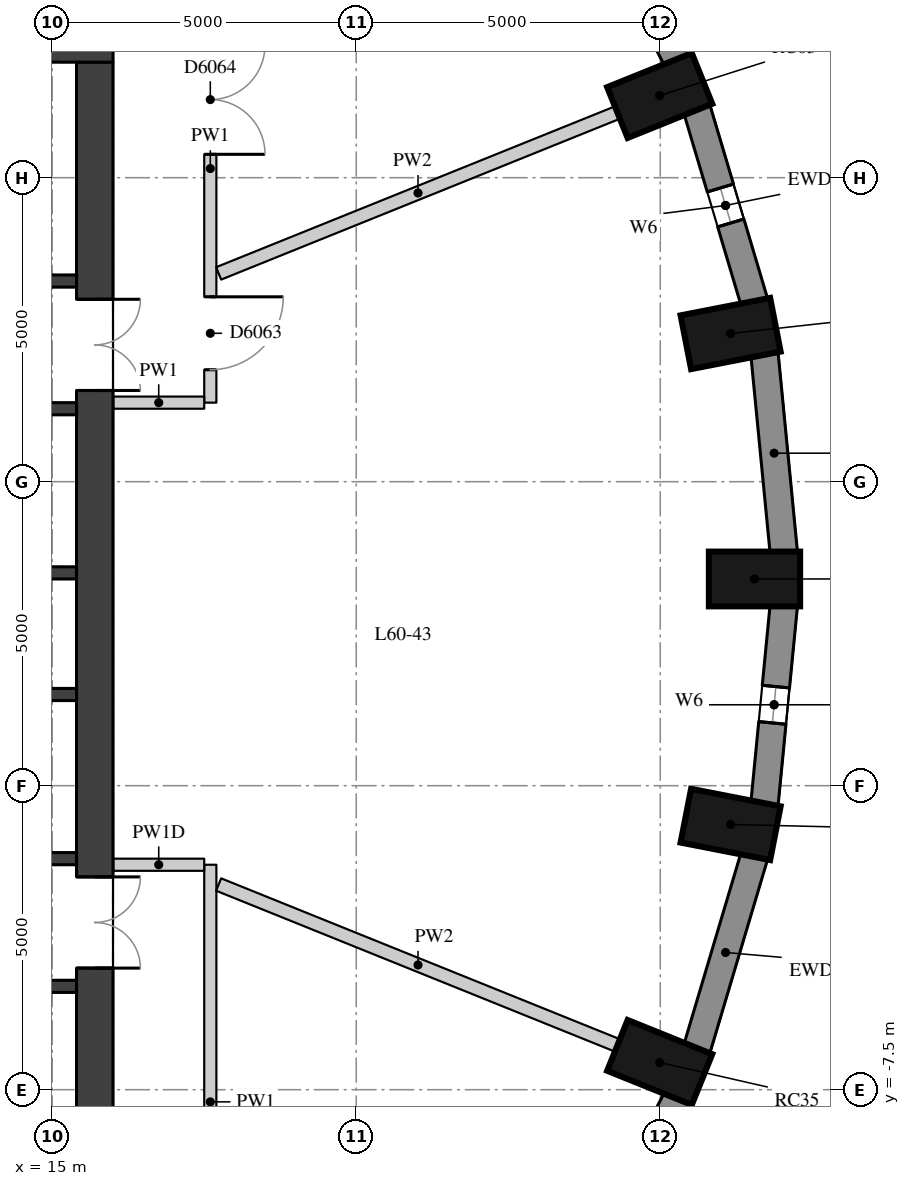
"""IFC4 building model, lengths in metres.
Left out: names, types, materials, properties, quantities, classifications, styles, units other than length and angle.
Written with IfcOpenShell. Run it as: python <this file> out.ifc"""

import sys

from ifc_helpers import new_model, si_unit, direction, frame, frame_2d, origin, origin_2d, place, context, subcontext, project, spatial, rectangle, extrude, element, fill, save


model = new_model("IFC4")
c1 = context("Model", 3, precision=1e-05, world=origin(), true_north=direction((0.0, 1.0)))
c2 = subcontext(c1, "Body", "Model", "MODEL_VIEW")
j1 = project(units=[si_unit("LENGTHUNIT", "METRE"), si_unit("PLANEANGLEUNIT", "RADIAN")], contexts=[c1])
p1 = place(None, origin())
s1 = spatial("IfcSite", under=j1, at=p1, CompositionType="ELEMENT")
p2 = place(p1, origin())
s2 = spatial("IfcBuilding", under=s1, at=p2, CompositionType="ELEMENT")
p3 = place(p2, frame((0.0, 0.0, 212.3)))
s3 = spatial("IfcBuildingStorey", under=s2, at=p3, CompositionType="ELEMENT", Elevation=212.3)
for number, where, z_axis, x_axis in (
    (1, (26.55, 0.9, 0.0), (0.0, 0.0, 1.0), (1.0, 0.0, 0.0)),
    (2, (26.157, 4.937, 0.0), (0.0, 0.0, 1.0), (0.981, 0.192, 0.0)),
    (3, (24.991, 8.852, 0.0), (0.0, 0.0, 1.0), (0.927, 0.374, 0.0)),
    (4, (24.991, -7.052, 0.0), (0.0, 0.0, 1.0), (0.927, -0.374, 0.0)),
    (5, (26.157, -3.137, 0.0), (0.0, 0.0, 1.0), (0.981, -0.192, 0.0)),
):
    element("IfcColumn", number, at=place(p3, frame(where, z_axis=z_axis, x_axis=x_axis)), inside=s3, PredefinedType="COLUMN", context=c2, shape_type="SweptSolid", body=[
        extrude(rectangle(XDim=1.5, YDim=0.9, at=origin_2d()), origin(), (0.0, 0.0, 1.0), 3.3),
    ])
p4 = place(p3, frame((27.032, 1.33, 0.0), z_axis=(0.0, 0.0, 1.0), x_axis=(-0.096824116835, 0.995301507283, 0.0)))
e6 = element("IfcWall", 6, at=p4, inside=s3, PredefinedType="SOLIDWALL", context=c2, shape_type="SweptSolid", body=[
    extrude(rectangle(XDim=3.293, YDim=0.45, at=frame_2d((1.646, 0.0))), origin(), (0.0, 0.0, 1.0), 3.02),
])
p5 = place(p3, frame((26.548, 5.452, 0.0), z_axis=(0.0, 0.0, 1.0), x_axis=(-0.285444972963, 0.958395099847, 0.0)))
e7 = element("IfcWall", 7, at=p5, inside=s3, PredefinedType="SOLIDWALL", context=c2, shape_type="SweptSolid", body=[
    extrude(rectangle(XDim=3.32, YDim=0.45, at=frame_2d((1.66, 0.0))), origin(), (0.0, 0.0, 1.0), 3.02),
])
p6 = place(p5, frame((1.36, 0.0, 0.4)))
e8 = element("IfcOpeningElement", 8, at=p6, cuts=e7, PredefinedType="OPENING", context=c2, shape_type="SweptSolid", body=[
    extrude(rectangle(XDim=0.6, YDim=1.75, at=frame_2d((0.3, 0.875))), frame((0.0, 0.235, 0.0), z_axis=(0.0, -1.0, 0.0), x_axis=(1.0, 0.0, 0.0)), (0.0, 0.0, 1.0), 0.47),
])
p7 = place(p3, frame((25.278, 9.432, 0.0), z_axis=(0.0, 0.0, 1.0), x_axis=(-0.460175500475, 0.887827972505, 0.0)))
e9 = element("IfcWall", 9, at=p7, inside=s3, PredefinedType="SOLIDWALL", context=c2, shape_type="SweptSolid", body=[
    extrude(rectangle(XDim=3.371, YDim=0.45, at=frame_2d((1.685, 0.0))), origin(), (0.0, 0.0, 1.0), 3.02),
])
p8 = place(p3, frame((23.727, -10.624, 0.0), z_axis=(0.0, 0.0, 1.0), x_axis=(0.460175500475, 0.887827972505, 0.0)))
e10 = element("IfcWall", 10, at=p8, inside=s3, PredefinedType="SOLIDWALL", context=c2, shape_type="SweptSolid", body=[
    extrude(rectangle(XDim=3.371, YDim=0.45, at=frame_2d((1.685, 0.0))), origin(), (0.0, 0.0, 1.0), 3.02),
])
p9 = place(p8, frame((1.385, 0.0, 0.4)))
e11 = element("IfcOpeningElement", 11, at=p9, cuts=e10, PredefinedType="OPENING", context=c2, shape_type="SweptSolid", body=[
    extrude(rectangle(XDim=0.6, YDim=1.75, at=frame_2d((0.3, 0.875))), frame((0.0, 0.235, 0.0), z_axis=(0.0, -1.0, 0.0), x_axis=(1.0, 0.0, 0.0)), (0.0, 0.0, 1.0), 0.47),
])
p10 = place(p3, frame((25.6, -6.834, 0.0), z_axis=(0.0, 0.0, 1.0), x_axis=(0.285444972963, 0.958395099847, 0.0)))
e12 = element("IfcWall", 12, at=p10, inside=s3, PredefinedType="SOLIDWALL", context=c2, shape_type="SweptSolid", body=[
    extrude(rectangle(XDim=3.32, YDim=0.45, at=frame_2d((1.66, 0.0))), origin(), (0.0, 0.0, 1.0), 3.02),
])
p11 = place(p3, frame((26.713, -2.808, 0.0), z_axis=(0.0, 0.0, 1.0), x_axis=(0.096816972749, 0.995302202242, 0.0)))
e13 = element("IfcWall", 13, at=p11, inside=s3, PredefinedType="SOLIDWALL", context=c2, shape_type="SweptSolid", body=[
    extrude(rectangle(XDim=3.293, YDim=0.45, at=frame_2d((1.646, 0.0))), origin(), (0.0, 0.0, 1.0), 3.02),
])
p12 = place(p11, frame((1.347, 0.0, 0.4)))
e14 = element("IfcOpeningElement", 14, at=p12, cuts=e13, PredefinedType="OPENING", context=c2, shape_type="SweptSolid", body=[
    extrude(rectangle(XDim=0.6, YDim=1.75, at=frame_2d((0.3, 0.875))), frame((0.0, 0.235, 0.0), z_axis=(0.0, -1.0, 0.0), x_axis=(1.0, 0.0, 0.0)), (0.0, 0.0, 1.0), 0.47),
])
p13 = place(p3, frame((15.7, -9.4, 0.0), z_axis=(0.0, 0.0, 1.0), x_axis=(0.0, 1.0, 0.0)))
e15 = element("IfcWall", 15, at=p13, inside=s3, PredefinedType="SHEAR", context=c2, shape_type="SweptSolid", body=[
    extrude(rectangle(XDim=18.8, YDim=0.6, at=frame_2d((9.4, 0.0))), origin(), (0.0, 0.0, 1.0), 3.02),
])
p14 = place(p13, frame((13.4, 0.0, 0.0)))
e16 = element("IfcOpeningElement", 16, at=p14, cuts=e15, PredefinedType="OPENING", context=c2, shape_type="SweptSolid", body=[
    extrude(rectangle(XDim=1.5, YDim=2.1, at=frame_2d((0.75, 1.05))), frame((0.0, 0.31, 0.0), z_axis=(0.0, -1.0, 0.0), x_axis=(1.0, 0.0, 0.0)), (0.0, 0.0, 1.0), 0.62),
])
p15 = place(p13, frame((3.9, 0.0, 0.0)))
e17 = element("IfcOpeningElement", 17, at=p15, cuts=e15, PredefinedType="OPENING", context=c2, shape_type="SweptSolid", body=[
    extrude(rectangle(XDim=1.5, YDim=2.1, at=frame_2d((0.75, 1.05))), frame((0.0, 0.31, 0.0), z_axis=(0.0, -1.0, 0.0), x_axis=(1.0, 0.0, 0.0)), (0.0, 0.0, 1.0), 0.62),
])
p16 = place(p3, frame((4.0, 9.7, 0.0), z_axis=(0.0, 0.0, 1.0), x_axis=(1.0, 0.0, 0.0)))
e18 = element("IfcWall", 18, at=p16, inside=s3, PredefinedType="SHEAR", context=c2, shape_type="SweptSolid", body=[
    extrude(rectangle(XDim=12.0, YDim=0.6, at=frame_2d((6.0, 0.0))), origin(), (0.0, 0.0, 1.0), 3.02),
])
p17 = place(p3, frame((4.6, 5.8, 0.0), z_axis=(0.0, 0.0, 1.0), x_axis=(1.0, 0.0, 0.0)))
e19 = element("IfcWall", 19, at=p17, inside=s3, PredefinedType="SHEAR", context=c2, shape_type="SweptSolid", body=[
    extrude(rectangle(XDim=10.8, YDim=0.2, at=frame_2d((5.4, 0.0))), origin(), (0.0, 0.0, 1.0), 3.02),
])
p18 = place(p17, frame((7.05, 0.0, 0.0)))
e20 = element("IfcOpeningElement", 20, at=p18, cuts=e19, PredefinedType="OPENING", context=c2, shape_type="SweptSolid", body=[
    extrude(rectangle(XDim=1.1, YDim=2.1, at=frame_2d((0.55, 1.05))), frame((0.0, 0.11, 0.0), z_axis=(0.0, -1.0, 0.0), x_axis=(1.0, 0.0, 0.0)), (0.0, 0.0, 1.0), 0.22),
])
p19 = place(p17, frame((9.05, 0.0, 0.0)))
e21 = element("IfcOpeningElement", 21, at=p19, cuts=e19, PredefinedType="OPENING", context=c2, shape_type="SweptSolid", body=[
    extrude(rectangle(XDim=1.1, YDim=2.1, at=frame_2d((0.55, 1.05))), frame((0.0, 0.11, 0.0), z_axis=(0.0, -1.0, 0.0), x_axis=(1.0, 0.0, 0.0)), (0.0, 0.0, 1.0), 0.22),
])
p20 = place(p3, frame((4.6, 3.7, 0.0), z_axis=(0.0, 0.0, 1.0), x_axis=(1.0, 0.0, 0.0)))
e22 = element("IfcWall", 22, at=p20, inside=s3, PredefinedType="SHEAR", context=c2, shape_type="SweptSolid", body=[
    extrude(rectangle(XDim=10.8, YDim=0.2, at=frame_2d((5.4, 0.0))), origin(), (0.0, 0.0, 1.0), 3.02),
])
p21 = place(p20, frame((6.6, 0.0, 0.0)))
e23 = element("IfcOpeningElement", 23, at=p21, cuts=e22, PredefinedType="OPENING", context=c2, shape_type="SweptSolid", body=[
    extrude(rectangle(XDim=1.1, YDim=2.1, at=frame_2d((0.55, 1.05))), frame((0.0, 0.11, 0.0), z_axis=(0.0, -1.0, 0.0), x_axis=(1.0, 0.0, 0.0)), (0.0, 0.0, 1.0), 0.22),
])
p22 = place(p20, frame((8.9, 0.0, 0.0)))
e24 = element("IfcOpeningElement", 24, at=p22, cuts=e22, PredefinedType="OPENING", context=c2, shape_type="SweptSolid", body=[
    extrude(rectangle(XDim=1.1, YDim=2.1, at=frame_2d((0.55, 1.05))), frame((0.0, 0.11, 0.0), z_axis=(0.0, -1.0, 0.0), x_axis=(1.0, 0.0, 0.0)), (0.0, 0.0, 1.0), 0.22),
])
for number, where, z_axis, x_axis in (
    (25, (4.6, 1.0, 0.0), (0.0, 0.0, 1.0), (1.0, 0.0, 0.0)),
    (26, (4.6, -1.0, 0.0), (0.0, 0.0, 1.0), (1.0, 0.0, 0.0)),
):
    element("IfcWall", number, at=place(p3, frame(where, z_axis=z_axis, x_axis=x_axis)), inside=s3, PredefinedType="SHEAR", context=c2, shape_type="SweptSolid", body=[
        extrude(rectangle(XDim=10.8, YDim=0.2, at=frame_2d((5.4, 0.0))), origin(), (0.0, 0.0, 1.0), 3.02),
    ])
p23 = place(p3, frame((4.6, -3.7, 0.0), z_axis=(0.0, 0.0, 1.0), x_axis=(1.0, 0.0, 0.0)))
e27 = element("IfcWall", 27, at=p23, inside=s3, PredefinedType="SHEAR", context=c2, shape_type="SweptSolid", body=[
    extrude(rectangle(XDim=10.8, YDim=0.2, at=frame_2d((5.4, 0.0))), origin(), (0.0, 0.0, 1.0), 3.02),
])
p24 = place(p23, frame((6.6, 0.0, 0.0)))
e28 = element("IfcOpeningElement", 28, at=p24, cuts=e27, PredefinedType="OPENING", context=c2, shape_type="SweptSolid", body=[
    extrude(rectangle(XDim=1.1, YDim=2.1, at=frame_2d((0.55, 1.05))), frame((0.0, 0.11, 0.0), z_axis=(0.0, -1.0, 0.0), x_axis=(1.0, 0.0, 0.0)), (0.0, 0.0, 1.0), 0.22),
])
p25 = place(p23, frame((8.9, 0.0, 0.0)))
e29 = element("IfcOpeningElement", 29, at=p25, cuts=e27, PredefinedType="OPENING", context=c2, shape_type="SweptSolid", body=[
    extrude(rectangle(XDim=1.1, YDim=2.1, at=frame_2d((0.55, 1.05))), frame((0.0, 0.11, 0.0), z_axis=(0.0, -1.0, 0.0), x_axis=(1.0, 0.0, 0.0)), (0.0, 0.0, 1.0), 0.22),
])
p26 = place(p3, frame((4.6, -5.8, 0.0), z_axis=(0.0, 0.0, 1.0), x_axis=(1.0, 0.0, 0.0)))
e30 = element("IfcWall", 30, at=p26, inside=s3, PredefinedType="SHEAR", context=c2, shape_type="SweptSolid", body=[
    extrude(rectangle(XDim=10.8, YDim=0.2, at=frame_2d((5.4, 0.0))), origin(), (0.0, 0.0, 1.0), 3.02),
])
p27 = place(p3, frame((17.6, -3.8, 0.0), z_axis=(0.0, 0.0, 1.0), x_axis=(0.0, -1.0, 0.0)))
e31 = element("IfcWall", 31, at=p27, inside=s3, PredefinedType="PARTITIONING", context=c2, shape_type="SweptSolid", body=[
    extrude(rectangle(XDim=7.8, YDim=0.2, at=frame_2d((3.9, 0.0))), origin(), (0.0, 0.0, 1.0), 3.02),
])
p28 = place(p3, frame((17.6, 11.5, 0.0), z_axis=(0.0, 0.0, 1.0), x_axis=(0.0, -1.0, 0.0)))
e32 = element("IfcWall", 32, at=p28, inside=s3, PredefinedType="PARTITIONING", context=c2, shape_type="SweptSolid", body=[
    extrude(rectangle(XDim=7.7, YDim=0.2, at=frame_2d((3.85, 0.0))), origin(), (0.0, 0.0, 1.0), 3.02),
])
p29 = place(p28, frame((5.959, 0.0, 0.0)))
e33 = element("IfcOpeningElement", 33, at=p29, cuts=e32, PredefinedType="OPENING", context=c2, shape_type="SweptSolid", body=[
    extrude(rectangle(XDim=1.2, YDim=2.1, at=frame_2d((0.6, 1.05))), frame((0.0, 0.11, 0.0), z_axis=(0.0, -1.0, 0.0), x_axis=(1.0, 0.0, 0.0)), (0.0, 0.0, 1.0), 0.22),
])
p30 = place(p28, frame((1.815, 0.0, 0.0)))
e34 = element("IfcOpeningElement", 34, at=p30, cuts=e32, PredefinedType="OPENING", context=c2, shape_type="SweptSolid", body=[
    extrude(rectangle(XDim=1.8, YDim=2.1, at=frame_2d((0.9, 1.05))), frame((0.0, 0.11, 0.0), z_axis=(0.0, -1.0, 0.0), x_axis=(1.0, 0.0, 0.0)), (0.0, 0.0, 1.0), 0.22),
])
p31 = place(p3, frame((17.5, 3.8, 0.0), z_axis=(0.0, 0.0, 1.0), x_axis=(-1.0, 0.0, 0.0)))
e35 = element("IfcWall", 35, at=p31, inside=s3, PredefinedType="PARTITIONING", context=c2, shape_type="SweptSolid", body=[
    extrude(rectangle(XDim=1.496, YDim=0.2, at=frame_2d((0.748, 0.0))), origin(), (0.0, 0.0, 1.0), 3.02),
])
p32 = place(p3, frame((16.004, -3.8, 0.0), z_axis=(0.0, 0.0, 1.0), x_axis=(1.0, 0.0, 0.0)))
e36 = element("IfcWall", 36, at=p32, inside=s3, PredefinedType="PARTITIONING", context=c2, shape_type="SweptSolid", body=[
    extrude(rectangle(XDim=1.496, YDim=0.2, at=frame_2d((0.748, 0.0))), origin(), (0.0, 0.0, 1.0), 2.47),
])
p33 = place(p3, frame((24.295, 8.571, 0.0), z_axis=(0.0, 0.0, 1.0), x_axis=(-0.927386999215, -0.374103399728, 0.0)))
e37 = element("IfcWall", 37, at=p33, inside=s3, PredefinedType="PARTITIONING", context=c2, shape_type="SweptSolid", body=[
    extrude(rectangle(XDim=7.072, YDim=0.22, at=frame_2d((3.536, 0.0))), origin(), (0.0, 0.0, 1.0), 3.02),
])
p34 = place(p3, frame((24.295, -6.771, 0.0), z_axis=(0.0, 0.0, 1.0), x_axis=(-0.927375021142, 0.374133091509, 0.0)))
e38 = element("IfcWall", 38, at=p34, inside=s3, PredefinedType="PARTITIONING", context=c2, shape_type="SweptSolid", body=[
    extrude(rectangle(XDim=7.072, YDim=0.22, at=frame_2d((3.536, 0.0))), origin(), (0.0, 0.0, 1.0), 3.02),
])
p35 = place(p6, origin())
e39 = element("IfcWindow", 39, at=p35, inside=s3, PartitioningType="SINGLE_PANEL", PredefinedType="WINDOW", context=c2, shape_type="SweptSolid", body=[
    extrude(rectangle(XDim=0.6, YDim=1.75, at=frame_2d((0.3, 0.875))), frame((0.0, 0.035, 0.0), z_axis=(0.0, -1.0, 0.0), x_axis=(1.0, 0.0, 0.0)), (0.0, 0.0, 1.0), 0.06),
])
fill(e8, e39)
p36 = place(p12, origin())
e40 = element("IfcWindow", 40, at=p36, inside=s3, PartitioningType="SINGLE_PANEL", PredefinedType="WINDOW", context=c2, shape_type="SweptSolid", body=[
    extrude(rectangle(XDim=0.6, YDim=1.75, at=frame_2d((0.3, 0.875))), frame((0.0, 0.035, 0.0), z_axis=(0.0, -1.0, 0.0), x_axis=(1.0, 0.0, 0.0)), (0.0, 0.0, 1.0), 0.06),
])
fill(e14, e40)
p37 = place(p14, origin())
e41 = element("IfcDoor", 41, at=p37, inside=s3, OperationType="DOUBLE_DOOR_SINGLE_SWING", PredefinedType="DOOR", context=c2, shape_type="SweptSolid", body=[
    extrude(rectangle(XDim=1.5, YDim=2.1, at=frame_2d((0.75, 1.05))), frame((0.0, 0.025, 0.0), z_axis=(0.0, -1.0, 0.0), x_axis=(1.0, 0.0, 0.0)), (0.0, 0.0, 1.0), 0.05),
])
fill(e16, e41)
p38 = place(p15, origin())
e42 = element("IfcDoor", 42, at=p38, inside=s3, OperationType="DOUBLE_DOOR_SINGLE_SWING", PredefinedType="DOOR", context=c2, shape_type="SweptSolid", body=[
    extrude(rectangle(XDim=1.5, YDim=2.1, at=frame_2d((0.75, 1.05))), frame((0.0, 0.025, 0.0), z_axis=(0.0, -1.0, 0.0), x_axis=(1.0, 0.0, 0.0)), (0.0, 0.0, 1.0), 0.05),
])
fill(e17, e42)
p39 = place(p29, origin())
e43 = element("IfcDoor", 43, at=p39, inside=s3, OperationType="SINGLE_SWING_LEFT", PredefinedType="DOOR", context=c2, shape_type="SweptSolid", body=[
    extrude(rectangle(XDim=1.2, YDim=2.1, at=frame_2d((0.6, 1.05))), frame((0.0, 0.025, 0.0), z_axis=(0.0, -1.0, 0.0), x_axis=(1.0, 0.0, 0.0)), (0.0, 0.0, 1.0), 0.05),
])
fill(e33, e43)
p40 = place(p30, origin())
e44 = element("IfcDoor", 44, at=p40, inside=s3, OperationType="DOUBLE_DOOR_SINGLE_SWING", PredefinedType="DOOR", context=c2, shape_type="SweptSolid", body=[
    extrude(rectangle(XDim=1.8, YDim=2.1, at=frame_2d((0.9, 1.05))), frame((0.0, 0.025, 0.0), z_axis=(0.0, -1.0, 0.0), x_axis=(1.0, 0.0, 0.0)), (0.0, 0.0, 1.0), 0.05),
])
fill(e34, e44)
save(model, sys.argv[1])
